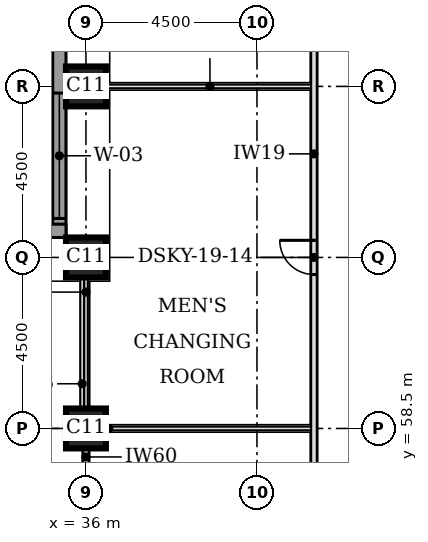
"""IFC4 building model, lengths in metres.
Left out: names, types, materials, properties, quantities, classifications, styles, units other than length and angle.
Written with IfcOpenShell. Run it as: python <this file> out.ifc"""

import sys

from ifc_helpers import new_model, si_unit, direction, frame, frame_2d, origin, origin_2d, place, context, subcontext, project, spatial, rectangle, extrude, element, fill, save


model = new_model("IFC4")
c1 = context("Model", 3, precision=1e-05, world=origin(), true_north=direction((0.0, 1.0)))
c2 = subcontext(c1, "Body", "Model", "MODEL_VIEW")
j1 = project(units=[si_unit("LENGTHUNIT", "METRE"), si_unit("PLANEANGLEUNIT", "RADIAN")], contexts=[c1])
p1 = place(None, origin())
s1 = spatial("IfcSite", under=j1, at=p1, CompositionType="ELEMENT")
p2 = place(p1, origin())
s2 = spatial("IfcBuilding", under=s1, at=p2, CompositionType="ELEMENT")
p3 = place(p2, frame((0.0, 0.0, 74.3)))
s3 = spatial("IfcBuildingStorey", under=s2, at=p3, CompositionType="ELEMENT", Elevation=74.3)
for number, where, z_axis, x_axis in (
    (1, (36.0, 58.5, 0.0), (0.0, 0.0, 1.0), (1.0, 0.0, 0.0)),
    (2, (36.0, 63.0, 0.0), (0.0, 0.0, 1.0), (1.0, 0.0, 0.0)),
    (3, (36.0, 67.5, 0.0), (0.0, 0.0, 1.0), (1.0, 0.0, 0.0)),
):
    element("IfcColumn", number, at=place(p3, frame(where, z_axis=z_axis, x_axis=x_axis)), inside=s3, PredefinedType="COLUMN", context=c2, shape_type="SweptSolid", body=[
        extrude(rectangle(XDim=1.05, YDim=1.05, at=origin_2d()), origin(), (0.0, 0.0, 1.0), 4.6),
    ])
p4 = place(p3, frame((35.3, 76.862, 0.0), z_axis=(0.0, 0.0, 1.0), x_axis=(0.0, -1.0, 0.0)))
e4 = element("IfcWall", 4, at=p4, inside=s3, PredefinedType="STANDARD", context=c2, shape_type="SweptSolid", body=[
    extrude(rectangle(XDim=13.337, YDim=0.35, at=frame_2d((6.669, 0.0))), origin(), (0.0, 0.0, 1.0), 4.425),
])
p5 = place(p4, frame((9.537, 0.0, 0.9)))
e5 = element("IfcOpeningElement", 5, at=p5, cuts=e4, PredefinedType="OPENING", context=c2, shape_type="SweptSolid", body=[
    extrude(rectangle(XDim=3.3, YDim=2.7, at=frame_2d((1.65, 1.35))), frame((0.0, 0.185, 0.0), z_axis=(0.0, -1.0, 0.0), x_axis=(1.0, 0.0, 0.0)), (0.0, 0.0, 1.0), 0.37),
])
p6 = place(p3, frame((35.475, 63.7, 0.0), z_axis=(0.0, 0.0, 1.0), x_axis=(-1.0, 0.0, 0.0)))
e6 = element("IfcWall", 6, at=p6, inside=s3, PredefinedType="STANDARD", context=c2, shape_type="SweptSolid", body=[
    extrude(rectangle(XDim=17.837, YDim=0.35, at=frame_2d((8.919, 0.0))), origin(), (0.0, 0.0, 1.0), 4.425),
])
p7 = place(p6, frame((0.5, 0.0, 0.9)))
e7 = element("IfcOpeningElement", 7, at=p7, cuts=e6, PredefinedType="OPENING", context=c2, shape_type="SweptSolid", body=[
    extrude(rectangle(XDim=3.3, YDim=2.7, at=frame_2d((1.65, 1.35))), frame((0.0, 0.185, 0.0), z_axis=(0.0, -1.0, 0.0), x_axis=(1.0, 0.0, 0.0)), (0.0, 0.0, 1.0), 0.37),
])
p8 = place(p6, frame((9.075, 0.0, 0.9)))
e8 = element("IfcOpeningElement", 8, at=p8, cuts=e6, PredefinedType="OPENING", context=c2, shape_type="SweptSolid", body=[
    extrude(rectangle(XDim=3.3, YDim=2.7, at=frame_2d((1.65, 1.35))), frame((0.0, 0.185, 0.0), z_axis=(0.0, -1.0, 0.0), x_axis=(1.0, 0.0, 0.0)), (0.0, 0.0, 1.0), 0.37),
])
p9 = place(p3, frame((36.0, 58.5, 0.0), z_axis=(0.0, 0.0, 1.0), x_axis=(1.0, 0.0, 0.0)))
e9 = element("IfcWall", 9, at=p9, inside=s3, PredefinedType="PARTITIONING", context=c2, shape_type="SweptSolid", body=[
    extrude(rectangle(XDim=6.0, YDim=0.1, at=frame_2d((3.0, 0.0))), origin(), (0.0, 0.0, 1.0), 4.45),
])
p10 = place(p3, frame((36.0, 58.5, 0.0), z_axis=(0.0, 0.0, 1.0), x_axis=(0.0, 1.0, 0.0)))
e10 = element("IfcWall", 10, at=p10, inside=s3, PredefinedType="PARTITIONING", context=c2, shape_type="SweptSolid", body=[
    extrude(rectangle(XDim=3.975, YDim=0.1, at=frame_2d((1.988, 0.0))), origin(), (0.0, 0.0, 1.0), 3.7),
])
p11 = place(p3, frame((36.525, 67.5, 0.0), z_axis=(0.0, 0.0, 1.0), x_axis=(1.0, 0.0, 0.0)))
e11 = element("IfcWall", 11, at=p11, inside=s3, PredefinedType="PARTITIONING", context=c2, shape_type="SweptSolid", body=[
    extrude(rectangle(XDim=5.475, YDim=0.1, at=frame_2d((2.738, 0.0))), origin(), (0.0, 0.0, 1.0), 4.45),
])
p12 = place(p3, frame((42.0, 53.25, 0.0), z_axis=(0.0, 0.0, 1.0), x_axis=(0.0, 1.0, 0.0)))
e12 = element("IfcWall", 12, at=p12, inside=s3, PredefinedType="PARTITIONING", context=c2, shape_type="SweptSolid", body=[
    extrude(rectangle(XDim=21.75, YDim=0.15, at=frame_2d((10.875, 0.0))), origin(), (0.0, 0.0, 1.0), 4.45),
])
p13 = place(p12, frame((2.175, 0.0, 0.0)))
e13 = element("IfcOpeningElement", 13, at=p13, cuts=e12, PredefinedType="OPENING", context=c2, shape_type="SweptSolid", body=[
    extrude(rectangle(XDim=0.9, YDim=2.1, at=frame_2d((0.45, 1.05))), frame((0.0, 0.085, 0.0), z_axis=(0.0, -1.0, 0.0), x_axis=(1.0, 0.0, 0.0)), (0.0, 0.0, 1.0), 0.17),
])
p14 = place(p12, frame((9.3, 0.0, 0.0)))
e14 = element("IfcOpeningElement", 14, at=p14, cuts=e12, PredefinedType="OPENING", context=c2, shape_type="SweptSolid", body=[
    extrude(rectangle(XDim=0.9, YDim=2.1, at=frame_2d((0.45, 1.05))), frame((0.0, 0.085, 0.0), z_axis=(0.0, -1.0, 0.0), x_axis=(1.0, 0.0, 0.0)), (0.0, 0.0, 1.0), 0.17),
])
p15 = place(p12, frame((17.55, 0.0, 0.0)))
e15 = element("IfcOpeningElement", 15, at=p15, cuts=e12, PredefinedType="OPENING", context=c2, shape_type="SweptSolid", body=[
    extrude(rectangle(XDim=0.9, YDim=2.1, at=frame_2d((0.45, 1.05))), frame((0.0, 0.085, 0.0), z_axis=(0.0, -1.0, 0.0), x_axis=(1.0, 0.0, 0.0)), (0.0, 0.0, 1.0), 0.17),
])
p16 = place(p3, frame((36.0, 57.0, 0.0), z_axis=(0.0, 0.0, 1.0), x_axis=(0.0, 1.0, 0.0)))
e16 = element("IfcWall", 16, at=p16, inside=s3, PredefinedType="PARTITIONING", context=c2, shape_type="SweptSolid", body=[
    extrude(rectangle(XDim=1.5, YDim=0.15, at=frame_2d((0.75, 0.0))), origin(), (0.0, 0.0, 1.0), 3.7),
])
p17 = place(p3, frame((35.9, 62.475, 0.0), z_axis=(0.0, 0.0, 1.0), x_axis=(0.0, -1.0, 0.0)))
e17 = element("IfcWall", 17, at=p17, inside=s3, PredefinedType="PARTITIONING", context=c2, shape_type="SweptSolid", body=[
    extrude(rectangle(XDim=3.998, YDim=0.1, at=frame_2d((1.999, 0.0))), origin(), (0.0, 0.0, 1.0), 3.7),
])
p18 = place(p5, origin())
e18 = element("IfcWindow", 18, at=p18, inside=s3, PartitioningType="SINGLE_PANEL", PredefinedType="WINDOW", context=c2, shape_type="SweptSolid", body=[
    extrude(rectangle(XDim=3.3, YDim=2.7, at=frame_2d((1.65, 1.35))), frame((0.0, 0.085, 0.0), z_axis=(0.0, -1.0, 0.0), x_axis=(1.0, 0.0, 0.0)), (0.0, 0.0, 1.0), 0.06),
])
fill(e5, e18)
p19 = place(p14, origin())
e19 = element("IfcDoor", 19, at=p19, inside=s3, OperationType="SINGLE_SWING_RIGHT", PredefinedType="DOOR", context=c2, shape_type="SweptSolid", body=[
    extrude(rectangle(XDim=0.9, YDim=2.1, at=frame_2d((0.45, 1.05))), frame((0.0, 0.025, 0.0), z_axis=(0.0, -1.0, 0.0), x_axis=(1.0, 0.0, 0.0)), (0.0, 0.0, 1.0), 0.05),
])
fill(e14, e19)
save(model, sys.argv[1])
